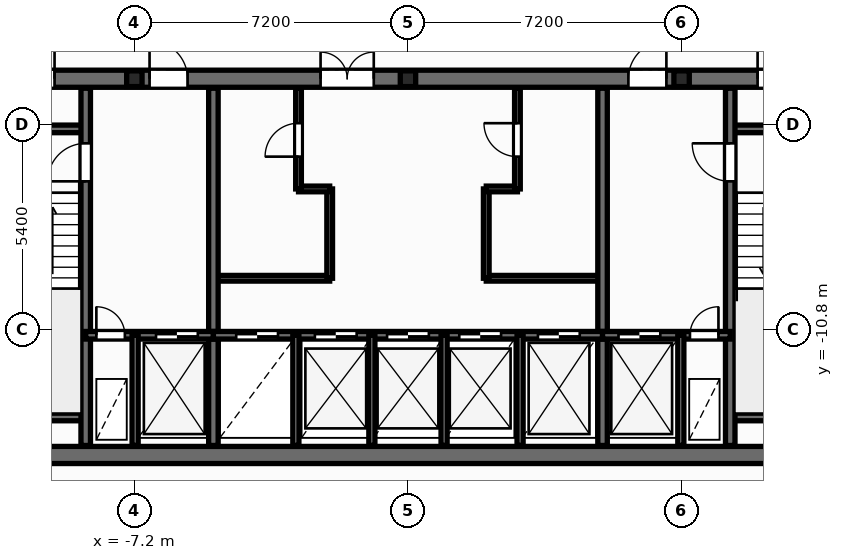
"""IFC4 building model, lengths in metres.
Left out: names, types, materials, properties, quantities, classifications, styles, units other than length and angle.
Written with IfcOpenShell. Run it as: python <this file> out.ifc"""

import sys

from ifc_helpers import new_model, si_unit, direction, frame, frame_2d, origin, origin_2d, place, context, subcontext, project, spatial, rectangle, i_section, extrude, element, fill, save


model = new_model("IFC4")
c1 = context("Model", 3, precision=1e-05, world=origin(), true_north=direction((0.0, 1.0)))
c2 = subcontext(c1, "Body", "Model", "MODEL_VIEW")
j1 = project(units=[si_unit("LENGTHUNIT", "METRE"), si_unit("PLANEANGLEUNIT", "RADIAN")], contexts=[c1])
p1 = place(None, origin())
s1 = spatial("IfcSite", under=j1, at=p1, CompositionType="ELEMENT")
p2 = place(p1, origin())
s2 = spatial("IfcBuilding", under=s1, at=p2, CompositionType="ELEMENT")
p3 = place(p2, frame((0.0, 0.0, 192.9)))
s3 = spatial("IfcBuildingStorey", under=s2, at=p3, CompositionType="ELEMENT", Elevation=192.9)
for number, where, z_axis, x_axis in (
    (1, (-7.2, -4.2, 0.0), (0.0, 0.0, 1.0), (1.0, 0.0, 0.0)),
    (2, (0.0, -4.2, 0.0), (0.0, 0.0, 1.0), (1.0, 0.0, 0.0)),
    (3, (7.2, -4.2, 0.0), (0.0, 0.0, 1.0), (1.0, 0.0, 0.0)),
):
    element("IfcColumn", number, at=place(p3, frame(where, z_axis=z_axis, x_axis=x_axis)), inside=s3, PredefinedType="PILASTER", context=c2, shape_type="SweptSolid", body=[
        extrude(i_section(OverallWidth=0.405, OverallDepth=0.414, WebThickness=0.022, FlangeThickness=0.032, at=origin_2d()), origin(), (0.0, 0.0, 1.0), 3.6),
    ])
p4 = place(p3, frame((-5.12, -9.45, 0.0), z_axis=(0.0, 0.0, 1.0), x_axis=(1.0, 0.0, 0.0)))
e4 = element("IfcWall", 4, at=p4, inside=s3, PredefinedType="PARTITIONING", context=c2, shape_type="SweptSolid", body=[
    extrude(rectangle(XDim=3.06, YDim=0.15, at=frame_2d((1.53, 0.0))), origin(), (0.0, 0.0, 1.0), 3.35),
])
p5 = place(p3, frame((-2.06, -9.45, 0.0), z_axis=(0.0, 0.0, 1.0), x_axis=(0.0, 1.0, 0.0)))
e5 = element("IfcWall", 5, at=p5, inside=s3, PredefinedType="PARTITIONING", context=c2, shape_type="SweptSolid", body=[
    extrude(rectangle(XDim=2.35, YDim=0.15, at=frame_2d((1.175, 0.0))), origin(), (0.0, 0.0, 1.0), 3.35),
])
p6 = place(p3, frame((-2.88, -7.1, 0.0), z_axis=(0.0, 0.0, 1.0), x_axis=(1.0, 0.0, 0.0)))
e6 = element("IfcWall", 6, at=p6, inside=s3, PredefinedType="PARTITIONING", context=c2, shape_type="SweptSolid", body=[
    extrude(rectangle(XDim=0.82, YDim=0.15, at=frame_2d((0.41, 0.0))), origin(), (0.0, 0.0, 1.0), 3.35),
])
p7 = place(p3, frame((-2.88, -7.1, 0.0), z_axis=(0.0, 0.0, 1.0), x_axis=(0.0, 1.0, 0.0)))
e7 = element("IfcWall", 7, at=p7, inside=s3, PredefinedType="PARTITIONING", context=c2, shape_type="SweptSolid", body=[
    extrude(rectangle(XDim=2.65, YDim=0.15, at=frame_2d((1.325, 0.0))), origin(), (0.0, 0.0, 1.0), 3.35),
])
p8 = place(p7, frame((0.85, 0.0, 0.0)))
e8 = element("IfcOpeningElement", 8, at=p8, cuts=e7, PredefinedType="OPENING", context=c2, shape_type="SweptSolid", body=[
    extrude(rectangle(XDim=0.886, YDim=2.104, at=frame_2d((0.44, 1.052))), frame((0.0, 0.085, 0.0), z_axis=(0.0, -1.0, 0.0), x_axis=(1.0, 0.0, 0.0)), (0.0, 0.0, 1.0), 0.17),
])
p9 = place(p3, frame((2.06, -9.45, 0.0), z_axis=(0.0, 0.0, 1.0), x_axis=(1.0, 0.0, 0.0)))
e9 = element("IfcWall", 9, at=p9, inside=s3, PredefinedType="PARTITIONING", context=c2, shape_type="SweptSolid", body=[
    extrude(rectangle(XDim=3.06, YDim=0.15, at=frame_2d((1.53, 0.0))), origin(), (0.0, 0.0, 1.0), 3.35),
])
p10 = place(p3, frame((2.06, -9.45, 0.0), z_axis=(0.0, 0.0, 1.0), x_axis=(0.0, 1.0, 0.0)))
e10 = element("IfcWall", 10, at=p10, inside=s3, PredefinedType="PARTITIONING", context=c2, shape_type="SweptSolid", body=[
    extrude(rectangle(XDim=2.35, YDim=0.15, at=frame_2d((1.175, 0.0))), origin(), (0.0, 0.0, 1.0), 3.35),
])
p11 = place(p3, frame((2.06, -7.1, 0.0), z_axis=(0.0, 0.0, 1.0), x_axis=(1.0, 0.0, 0.0)))
e11 = element("IfcWall", 11, at=p11, inside=s3, PredefinedType="PARTITIONING", context=c2, shape_type="SweptSolid", body=[
    extrude(rectangle(XDim=0.82, YDim=0.15, at=frame_2d((0.41, 0.0))), origin(), (0.0, 0.0, 1.0), 3.35),
])
p12 = place(p3, frame((2.88, -7.1, 0.0), z_axis=(0.0, 0.0, 1.0), x_axis=(0.0, 1.0, 0.0)))
e12 = element("IfcWall", 12, at=p12, inside=s3, PredefinedType="PARTITIONING", context=c2, shape_type="SweptSolid", body=[
    extrude(rectangle(XDim=2.65, YDim=0.15, at=frame_2d((1.325, 0.0))), origin(), (0.0, 0.0, 1.0), 3.35),
])
p13 = place(p12, frame((0.85, 0.0, 0.0)))
e13 = element("IfcOpeningElement", 13, at=p13, cuts=e12, PredefinedType="OPENING", context=c2, shape_type="SweptSolid", body=[
    extrude(rectangle(XDim=0.886, YDim=2.104, at=frame_2d((0.44, 1.052))), frame((0.0, 0.085, 0.0), z_axis=(0.0, -1.0, 0.0), x_axis=(1.0, 0.0, 0.0)), (0.0, 0.0, 1.0), 0.17),
])
p14 = place(p3, frame((-12.65, -14.1, 0.0), z_axis=(0.0, 0.0, 1.0), x_axis=(1.0, 0.0, 0.0)))
e14 = element("IfcWall", 14, at=p14, inside=s3, PredefinedType="SHEAR", context=c2, shape_type="SweptSolid", body=[
    extrude(rectangle(XDim=25.3, YDim=0.45, at=frame_2d((12.65, 0.0))), origin(), (0.0, 0.0, 1.0), 3.6),
])
p15 = place(p3, frame((-12.65, -4.2, 0.0), z_axis=(0.0, 0.0, 1.0), x_axis=(1.0, 0.0, 0.0)))
e15 = element("IfcWall", 15, at=p15, inside=s3, PredefinedType="SHEAR", context=c2, shape_type="SweptSolid", body=[
    extrude(rectangle(XDim=25.3, YDim=0.45, at=frame_2d((12.65, 0.0))), origin(), (0.0, 0.0, 1.0), 3.6),
])
p16 = place(p15, frame((0.95, 0.0, 0.0)))
e16 = element("IfcOpeningElement", 16, at=p16, cuts=e15, PredefinedType="OPENING", context=c2, shape_type="SweptSolid", body=[
    extrude(rectangle(XDim=0.756, YDim=2.054, at=frame_2d((0.375, 1.027))), frame((0.0, 0.235, 0.0), z_axis=(0.0, -1.0, 0.0), x_axis=(1.0, 0.0, 0.0)), (0.0, 0.0, 1.0), 0.47),
])
p17 = place(p15, frame((2.6, 0.0, 0.0)))
e17 = element("IfcOpeningElement", 17, at=p17, cuts=e15, PredefinedType="OPENING", context=c2, shape_type="SweptSolid", body=[
    extrude(rectangle(XDim=0.756, YDim=2.054, at=frame_2d((0.375, 1.027))), frame((0.0, 0.235, 0.0), z_axis=(0.0, -1.0, 0.0), x_axis=(1.0, 0.0, 0.0)), (0.0, 0.0, 1.0), 0.47),
])
p18 = place(p15, frame((21.85, 0.0, 0.0)))
e18 = element("IfcOpeningElement", 18, at=p18, cuts=e15, PredefinedType="OPENING", context=c2, shape_type="SweptSolid", body=[
    extrude(rectangle(XDim=0.756, YDim=2.054, at=frame_2d((0.375, 1.027))), frame((0.0, 0.235, 0.0), z_axis=(0.0, -1.0, 0.0), x_axis=(1.0, 0.0, 0.0)), (0.0, 0.0, 1.0), 0.47),
])
p19 = place(p15, frame((23.5, 0.0, 0.0)))
e19 = element("IfcOpeningElement", 19, at=p19, cuts=e15, PredefinedType="OPENING", context=c2, shape_type="SweptSolid", body=[
    extrude(rectangle(XDim=0.756, YDim=2.054, at=frame_2d((0.375, 1.027))), frame((0.0, 0.235, 0.0), z_axis=(0.0, -1.0, 0.0), x_axis=(1.0, 0.0, 0.0)), (0.0, 0.0, 1.0), 0.47),
])
p20 = place(p15, frame((5.85, 0.0, 0.0)))
e20 = element("IfcOpeningElement", 20, at=p20, cuts=e15, PredefinedType="OPENING", context=c2, shape_type="SweptSolid", body=[
    extrude(rectangle(XDim=1.006, YDim=2.104, at=frame_2d((0.5, 1.052))), frame((0.0, 0.235, 0.0), z_axis=(0.0, -1.0, 0.0), x_axis=(1.0, 0.0, 0.0)), (0.0, 0.0, 1.0), 0.47),
])
p21 = place(p15, frame((10.35, 0.0, 0.0)))
e21 = element("IfcOpeningElement", 21, at=p21, cuts=e15, PredefinedType="OPENING", context=c2, shape_type="SweptSolid", body=[
    extrude(rectangle(XDim=1.406, YDim=2.154, at=frame_2d((0.7, 1.077))), frame((0.0, 0.235, 0.0), z_axis=(0.0, -1.0, 0.0), x_axis=(1.0, 0.0, 0.0)), (0.0, 0.0, 1.0), 0.47),
])
p22 = place(p15, frame((18.45, 0.0, 0.0)))
e22 = element("IfcOpeningElement", 22, at=p22, cuts=e15, PredefinedType="OPENING", context=c2, shape_type="SweptSolid", body=[
    extrude(rectangle(XDim=1.006, YDim=2.104, at=frame_2d((0.5, 1.052))), frame((0.0, 0.235, 0.0), z_axis=(0.0, -1.0, 0.0), x_axis=(1.0, 0.0, 0.0)), (0.0, 0.0, 1.0), 0.47),
])
for number, where, z_axis, x_axis in (
    (23, (-12.35, -5.52, 0.0), (0.0, 0.0, 1.0), (1.0, 0.0, 0.0)),
    (24, (-12.35, -13.1, 0.0), (0.0, 0.0, 1.0), (1.0, 0.0, 0.0)),
    (25, (8.48, -5.52, 0.0), (0.0, 0.0, 1.0), (1.0, 0.0, 0.0)),
    (26, (8.48, -13.1, 0.0), (0.0, 0.0, 1.0), (1.0, 0.0, 0.0)),
):
    element("IfcWall", number, at=place(p3, frame(where, z_axis=z_axis, x_axis=x_axis)), inside=s3, PredefinedType="SOLIDWALL", context=c2, shape_type="SweptSolid", body=[
        extrude(rectangle(XDim=3.87, YDim=0.2, at=frame_2d((1.935, 0.0))), origin(), (0.0, 0.0, 1.0), 3.6),
    ])
p23 = place(p3, frame((-8.48, -13.85, 0.0), z_axis=(0.0, 0.0, 1.0), x_axis=(0.0, 1.0, 0.0)))
e27 = element("IfcWall", 27, at=p23, inside=s3, PredefinedType="SHEAR", context=c2, shape_type="SweptSolid", body=[
    extrude(rectangle(XDim=9.4, YDim=0.25, at=frame_2d((4.7, 0.0))), origin(), (0.0, 0.0, 1.0), 3.6),
])
p24 = place(p23, frame((6.95, 0.0, 0.0)))
e28 = element("IfcOpeningElement", 28, at=p24, cuts=e27, PredefinedType="OPENING", context=c2, shape_type="SweptSolid", body=[
    extrude(rectangle(XDim=1.006, YDim=2.104, at=frame_2d((0.5, 1.052))), frame((0.0, 0.135, 0.0), z_axis=(0.0, -1.0, 0.0), x_axis=(1.0, 0.0, 0.0)), (0.0, 0.0, 1.0), 0.27),
])
p25 = place(p3, frame((8.48, -13.85, 0.0), z_axis=(0.0, 0.0, 1.0), x_axis=(0.0, 1.0, 0.0)))
e29 = element("IfcWall", 29, at=p25, inside=s3, PredefinedType="SHEAR", context=c2, shape_type="SweptSolid", body=[
    extrude(rectangle(XDim=9.4, YDim=0.25, at=frame_2d((4.7, 0.0))), origin(), (0.0, 0.0, 1.0), 3.6),
])
p26 = place(p25, frame((6.95, 0.0, 0.0)))
e30 = element("IfcOpeningElement", 30, at=p26, cuts=e29, PredefinedType="OPENING", context=c2, shape_type="SweptSolid", body=[
    extrude(rectangle(XDim=1.006, YDim=2.104, at=frame_2d((0.5, 1.052))), frame((0.0, 0.135, 0.0), z_axis=(0.0, -1.0, 0.0), x_axis=(1.0, 0.0, 0.0)), (0.0, 0.0, 1.0), 0.27),
])
for number, where, z_axis, x_axis in (
    (31, (-5.12, -13.85, 0.0), (0.0, 0.0, 1.0), (0.0, 1.0, 0.0)),
    (32, (5.12, -13.85, 0.0), (0.0, 0.0, 1.0), (0.0, 1.0, 0.0)),
):
    element("IfcWall", number, at=place(p3, frame(where, z_axis=z_axis, x_axis=x_axis)), inside=s3, PredefinedType="SHEAR", context=c2, shape_type="SweptSolid", body=[
        extrude(rectangle(XDim=9.4, YDim=0.25, at=frame_2d((4.7, 0.0))), origin(), (0.0, 0.0, 1.0), 3.6),
    ])
p27 = place(p3, frame((-8.48, -10.95, 0.0), z_axis=(0.0, 0.0, 1.0), x_axis=(1.0, 0.0, 0.0)))
e33 = element("IfcWall", 33, at=p27, inside=s3, PredefinedType="SOLIDWALL", context=c2, shape_type="SweptSolid", body=[
    extrude(rectangle(XDim=3.36, YDim=0.2, at=frame_2d((1.68, 0.0))), origin(), (0.0, 0.0, 1.0), 3.6),
])
p28 = place(p27, frame((0.28, 0.0, 0.0)))
e34 = element("IfcOpeningElement", 34, at=p28, cuts=e33, PredefinedType="OPENING", context=c2, shape_type="SweptSolid", body=[
    extrude(rectangle(XDim=0.756, YDim=2.054, at=frame_2d((0.375, 1.027))), frame((0.0, 0.11, 0.0), z_axis=(0.0, -1.0, 0.0), x_axis=(1.0, 0.0, 0.0)), (0.0, 0.0, 1.0), 0.22),
])
p29 = place(p27, frame((1.85, 0.0, 0.0)))
e35 = element("IfcOpeningElement", 35, at=p29, cuts=e33, PredefinedType="OPENING", context=c2, shape_type="SweptSolid", body=[
    extrude(rectangle(XDim=1.106, YDim=2.104, at=frame_2d((0.55, 1.052))), frame((0.0, 0.11, 0.0), z_axis=(0.0, -1.0, 0.0), x_axis=(1.0, 0.0, 0.0)), (0.0, 0.0, 1.0), 0.22),
])
p30 = place(p3, frame((-5.12, -10.95, 0.0), z_axis=(0.0, 0.0, 1.0), x_axis=(1.0, 0.0, 0.0)))
e36 = element("IfcWall", 36, at=p30, inside=s3, PredefinedType="SOLIDWALL", context=c2, shape_type="SweptSolid", body=[
    extrude(rectangle(XDim=10.24, YDim=0.2, at=frame_2d((5.12, 0.0))), origin(), (0.0, 0.0, 1.0), 3.6),
])
p31 = place(p30, frame((0.6, 0.0, 0.0)))
e37 = element("IfcOpeningElement", 37, at=p31, cuts=e36, PredefinedType="OPENING", context=c2, shape_type="SweptSolid", body=[
    extrude(rectangle(XDim=1.106, YDim=2.104, at=frame_2d((0.55, 1.052))), frame((0.0, 0.11, 0.0), z_axis=(0.0, -1.0, 0.0), x_axis=(1.0, 0.0, 0.0)), (0.0, 0.0, 1.0), 0.22),
])
p32 = place(p30, frame((2.67, 0.0, 0.0)))
e38 = element("IfcOpeningElement", 38, at=p32, cuts=e36, PredefinedType="OPENING", context=c2, shape_type="SweptSolid", body=[
    extrude(rectangle(XDim=1.106, YDim=2.104, at=frame_2d((0.55, 1.052))), frame((0.0, 0.11, 0.0), z_axis=(0.0, -1.0, 0.0), x_axis=(1.0, 0.0, 0.0)), (0.0, 0.0, 1.0), 0.22),
])
p33 = place(p30, frame((4.57, 0.0, 0.0)))
e39 = element("IfcOpeningElement", 39, at=p33, cuts=e36, PredefinedType="OPENING", context=c2, shape_type="SweptSolid", body=[
    extrude(rectangle(XDim=1.106, YDim=2.104, at=frame_2d((0.55, 1.052))), frame((0.0, 0.11, 0.0), z_axis=(0.0, -1.0, 0.0), x_axis=(1.0, 0.0, 0.0)), (0.0, 0.0, 1.0), 0.22),
])
p34 = place(p30, frame((6.47, 0.0, 0.0)))
e40 = element("IfcOpeningElement", 40, at=p34, cuts=e36, PredefinedType="OPENING", context=c2, shape_type="SweptSolid", body=[
    extrude(rectangle(XDim=1.106, YDim=2.104, at=frame_2d((0.55, 1.052))), frame((0.0, 0.11, 0.0), z_axis=(0.0, -1.0, 0.0), x_axis=(1.0, 0.0, 0.0)), (0.0, 0.0, 1.0), 0.22),
])
p35 = place(p30, frame((8.54, 0.0, 0.0)))
e41 = element("IfcOpeningElement", 41, at=p35, cuts=e36, PredefinedType="OPENING", context=c2, shape_type="SweptSolid", body=[
    extrude(rectangle(XDim=1.106, YDim=2.104, at=frame_2d((0.55, 1.052))), frame((0.0, 0.11, 0.0), z_axis=(0.0, -1.0, 0.0), x_axis=(1.0, 0.0, 0.0)), (0.0, 0.0, 1.0), 0.22),
])
p36 = place(p3, frame((5.12, -10.95, 0.0), z_axis=(0.0, 0.0, 1.0), x_axis=(1.0, 0.0, 0.0)))
e42 = element("IfcWall", 42, at=p36, inside=s3, PredefinedType="SOLIDWALL", context=c2, shape_type="SweptSolid", body=[
    extrude(rectangle(XDim=3.36, YDim=0.2, at=frame_2d((1.68, 0.0))), origin(), (0.0, 0.0, 1.0), 3.6),
])
p37 = place(p36, frame((0.42, 0.0, 0.0)))
e43 = element("IfcOpeningElement", 43, at=p37, cuts=e42, PredefinedType="OPENING", context=c2, shape_type="SweptSolid", body=[
    extrude(rectangle(XDim=1.106, YDim=2.104, at=frame_2d((0.55, 1.052))), frame((0.0, 0.11, 0.0), z_axis=(0.0, -1.0, 0.0), x_axis=(1.0, 0.0, 0.0)), (0.0, 0.0, 1.0), 0.22),
])
p38 = place(p36, frame((2.3, 0.0, 0.0)))
e44 = element("IfcOpeningElement", 44, at=p38, cuts=e42, PredefinedType="OPENING", context=c2, shape_type="SweptSolid", body=[
    extrude(rectangle(XDim=0.756, YDim=2.054, at=frame_2d((0.375, 1.027))), frame((0.0, 0.11, 0.0), z_axis=(0.0, -1.0, 0.0), x_axis=(1.0, 0.0, 0.0)), (0.0, 0.0, 1.0), 0.22),
])
for number, where, z_axis, x_axis in (
    (45, (-7.18, -13.85, 0.0), (0.0, 0.0, 1.0), (0.0, 1.0, 0.0)),
    (46, (7.18, -13.85, 0.0), (0.0, 0.0, 1.0), (0.0, 1.0, 0.0)),
    (47, (-2.95, -13.85, 0.0), (0.0, 0.0, 1.0), (0.0, 1.0, 0.0)),
    (48, (2.95, -13.85, 0.0), (0.0, 0.0, 1.0), (0.0, 1.0, 0.0)),
    (49, (-0.95, -13.85, 0.0), (0.0, 0.0, 1.0), (0.0, 1.0, 0.0)),
    (50, (0.95, -13.85, 0.0), (0.0, 0.0, 1.0), (0.0, 1.0, 0.0)),
):
    element("IfcWall", number, at=place(p3, frame(where, z_axis=z_axis, x_axis=x_axis)), inside=s3, PredefinedType="PARTITIONING", context=c2, shape_type="SweptSolid", body=[
        extrude(rectangle(XDim=2.9, YDim=0.16, at=frame_2d((1.45, 0.0))), origin(), (0.0, 0.0, 1.0), 2.475),
    ])
p39 = place(p8, origin())
e51 = element("IfcDoor", 51, at=p39, inside=s3, OperationType="SINGLE_SWING_LEFT", PredefinedType="DOOR", context=c2, shape_type="SweptSolid", body=[
    extrude(rectangle(XDim=0.88, YDim=2.1, at=frame_2d((0.44, 1.05))), frame((0.0, 0.025, 0.0), z_axis=(0.0, -1.0, 0.0), x_axis=(1.0, 0.0, 0.0)), (0.0, 0.0, 1.0), 0.05),
])
fill(e8, e51)
p40 = place(p13, origin())
e52 = element("IfcDoor", 52, at=p40, inside=s3, OperationType="SINGLE_SWING_RIGHT", PredefinedType="DOOR", context=c2, shape_type="SweptSolid", body=[
    extrude(rectangle(XDim=0.88, YDim=2.1, at=frame_2d((0.44, 1.05))), frame((0.0, 0.025, 0.0), z_axis=(0.0, -1.0, 0.0), x_axis=(1.0, 0.0, 0.0)), (0.0, 0.0, 1.0), 0.05),
])
fill(e13, e52)
p41 = place(p24, origin())
e53 = element("IfcDoor", 53, at=p41, inside=s3, OperationType="SINGLE_SWING_LEFT", PredefinedType="DOOR", context=c2, shape_type="SweptSolid", body=[
    extrude(rectangle(XDim=1.0, YDim=2.1, at=frame_2d((0.5, 1.05))), frame((0.0, 0.025, 0.0), z_axis=(0.0, -1.0, 0.0), x_axis=(1.0, 0.0, 0.0)), (0.0, 0.0, 1.0), 0.05),
])
fill(e28, e53)
p42 = place(p26, origin())
e54 = element("IfcDoor", 54, at=p42, inside=s3, OperationType="SINGLE_SWING_RIGHT", PredefinedType="DOOR", context=c2, shape_type="SweptSolid", body=[
    extrude(rectangle(XDim=1.0, YDim=2.1, at=frame_2d((0.5, 1.05))), frame((0.0, 0.025, 0.0), z_axis=(0.0, -1.0, 0.0), x_axis=(1.0, 0.0, 0.0)), (0.0, 0.0, 1.0), 0.05),
])
fill(e30, e54)
p43 = place(p28, origin())
e55 = element("IfcDoor", 55, at=p43, inside=s3, OperationType="SINGLE_SWING_LEFT", PredefinedType="DOOR", context=c2, shape_type="SweptSolid", body=[
    extrude(rectangle(XDim=0.75, YDim=2.05, at=frame_2d((0.375, 1.025))), frame((0.0, 0.025, 0.0), z_axis=(0.0, -1.0, 0.0), x_axis=(1.0, 0.0, 0.0)), (0.0, 0.0, 1.0), 0.05),
])
fill(e34, e55)
p44 = place(p29, origin())
e56 = element("IfcDoor", 56, at=p44, inside=s3, OperationType="DOUBLE_DOOR_SLIDING", PredefinedType="DOOR", context=c2, shape_type="SweptSolid", body=[
    extrude(rectangle(XDim=1.1, YDim=2.1, at=frame_2d((0.55, 1.05))), frame((0.0, 0.025, 0.0), z_axis=(0.0, -1.0, 0.0), x_axis=(1.0, 0.0, 0.0)), (0.0, 0.0, 1.0), 0.05),
])
fill(e35, e56)
p45 = place(p37, origin())
e57 = element("IfcDoor", 57, at=p45, inside=s3, OperationType="DOUBLE_DOOR_SLIDING", PredefinedType="DOOR", context=c2, shape_type="SweptSolid", body=[
    extrude(rectangle(XDim=1.1, YDim=2.1, at=frame_2d((0.55, 1.05))), frame((0.0, 0.025, 0.0), z_axis=(0.0, -1.0, 0.0), x_axis=(1.0, 0.0, 0.0)), (0.0, 0.0, 1.0), 0.05),
])
fill(e43, e57)
p46 = place(p38, origin())
e58 = element("IfcDoor", 58, at=p46, inside=s3, OperationType="SINGLE_SWING_RIGHT", PredefinedType="DOOR", context=c2, shape_type="SweptSolid", body=[
    extrude(rectangle(XDim=0.75, YDim=2.05, at=frame_2d((0.375, 1.025))), frame((0.0, 0.025, 0.0), z_axis=(0.0, -1.0, 0.0), x_axis=(1.0, 0.0, 0.0)), (0.0, 0.0, 1.0), 0.05),
])
fill(e44, e58)
p47 = place(p31, origin())
e59 = element("IfcDoor", 59, at=p47, inside=s3, OperationType="DOUBLE_DOOR_SLIDING", PredefinedType="DOOR", context=c2, shape_type="SweptSolid", body=[
    extrude(rectangle(XDim=1.1, YDim=2.1, at=frame_2d((0.55, 1.05))), frame((0.0, 0.025, 0.0), z_axis=(0.0, -1.0, 0.0), x_axis=(1.0, 0.0, 0.0)), (0.0, 0.0, 1.0), 0.05),
])
fill(e37, e59)
p48 = place(p32, origin())
e60 = element("IfcDoor", 60, at=p48, inside=s3, OperationType="DOUBLE_DOOR_SLIDING", PredefinedType="DOOR", context=c2, shape_type="SweptSolid", body=[
    extrude(rectangle(XDim=1.1, YDim=2.1, at=frame_2d((0.55, 1.05))), frame((0.0, 0.025, 0.0), z_axis=(0.0, -1.0, 0.0), x_axis=(1.0, 0.0, 0.0)), (0.0, 0.0, 1.0), 0.05),
])
fill(e38, e60)
p49 = place(p33, origin())
e61 = element("IfcDoor", 61, at=p49, inside=s3, OperationType="DOUBLE_DOOR_SLIDING", PredefinedType="DOOR", context=c2, shape_type="SweptSolid", body=[
    extrude(rectangle(XDim=1.1, YDim=2.1, at=frame_2d((0.55, 1.05))), frame((0.0, 0.025, 0.0), z_axis=(0.0, -1.0, 0.0), x_axis=(1.0, 0.0, 0.0)), (0.0, 0.0, 1.0), 0.05),
])
fill(e39, e61)
p50 = place(p34, origin())
e62 = element("IfcDoor", 62, at=p50, inside=s3, OperationType="DOUBLE_DOOR_SLIDING", PredefinedType="DOOR", context=c2, shape_type="SweptSolid", body=[
    extrude(rectangle(XDim=1.1, YDim=2.1, at=frame_2d((0.55, 1.05))), frame((0.0, 0.025, 0.0), z_axis=(0.0, -1.0, 0.0), x_axis=(1.0, 0.0, 0.0)), (0.0, 0.0, 1.0), 0.05),
])
fill(e40, e62)
p51 = place(p35, origin())
e63 = element("IfcDoor", 63, at=p51, inside=s3, OperationType="DOUBLE_DOOR_SLIDING", PredefinedType="DOOR", context=c2, shape_type="SweptSolid", body=[
    extrude(rectangle(XDim=1.1, YDim=2.1, at=frame_2d((0.55, 1.05))), frame((0.0, 0.025, 0.0), z_axis=(0.0, -1.0, 0.0), x_axis=(1.0, 0.0, 0.0)), (0.0, 0.0, 1.0), 0.05),
])
fill(e41, e63)
p52 = place(p17, origin())
e64 = element("IfcDoor", 64, at=p52, inside=s3, OperationType="SINGLE_SWING_RIGHT", PredefinedType="DOOR", context=c2, shape_type="SweptSolid", body=[
    extrude(rectangle(XDim=0.75, YDim=2.05, at=frame_2d((0.375, 1.025))), frame((0.0, 0.025, 0.0), z_axis=(0.0, -1.0, 0.0), x_axis=(1.0, 0.0, 0.0)), (0.0, 0.0, 1.0), 0.05),
])
fill(e17, e64)
p53 = place(p18, origin())
e65 = element("IfcDoor", 65, at=p53, inside=s3, OperationType="SINGLE_SWING_LEFT", PredefinedType="DOOR", context=c2, shape_type="SweptSolid", body=[
    extrude(rectangle(XDim=0.75, YDim=2.05, at=frame_2d((0.375, 1.025))), frame((0.0, 0.025, 0.0), z_axis=(0.0, -1.0, 0.0), x_axis=(1.0, 0.0, 0.0)), (0.0, 0.0, 1.0), 0.05),
])
fill(e18, e65)
p54 = place(p20, origin())
e66 = element("IfcDoor", 66, at=p54, inside=s3, OperationType="SINGLE_SWING_LEFT", PredefinedType="DOOR", context=c2, shape_type="SweptSolid", body=[
    extrude(rectangle(XDim=1.0, YDim=2.1, at=frame_2d((0.5, 1.05))), frame((0.0, 0.025, 0.0), z_axis=(0.0, -1.0, 0.0), x_axis=(1.0, 0.0, 0.0)), (0.0, 0.0, 1.0), 0.05),
])
fill(e20, e66)
p55 = place(p21, origin())
e67 = element("IfcDoor", 67, at=p55, inside=s3, OperationType="DOUBLE_DOOR_SINGLE_SWING", PredefinedType="DOOR", context=c2, shape_type="SweptSolid", body=[
    extrude(rectangle(XDim=1.4, YDim=2.15, at=frame_2d((0.7, 1.075))), frame((0.0, 0.025, 0.0), z_axis=(0.0, -1.0, 0.0), x_axis=(1.0, 0.0, 0.0)), (0.0, 0.0, 1.0), 0.05),
])
fill(e21, e67)
p56 = place(p22, origin())
e68 = element("IfcDoor", 68, at=p56, inside=s3, OperationType="SINGLE_SWING_RIGHT", PredefinedType="DOOR", context=c2, shape_type="SweptSolid", body=[
    extrude(rectangle(XDim=1.0, YDim=2.1, at=frame_2d((0.5, 1.05))), frame((0.0, 0.025, 0.0), z_axis=(0.0, -1.0, 0.0), x_axis=(1.0, 0.0, 0.0)), (0.0, 0.0, 1.0), 0.05),
])
fill(e22, e68)
save(model, sys.argv[1])
